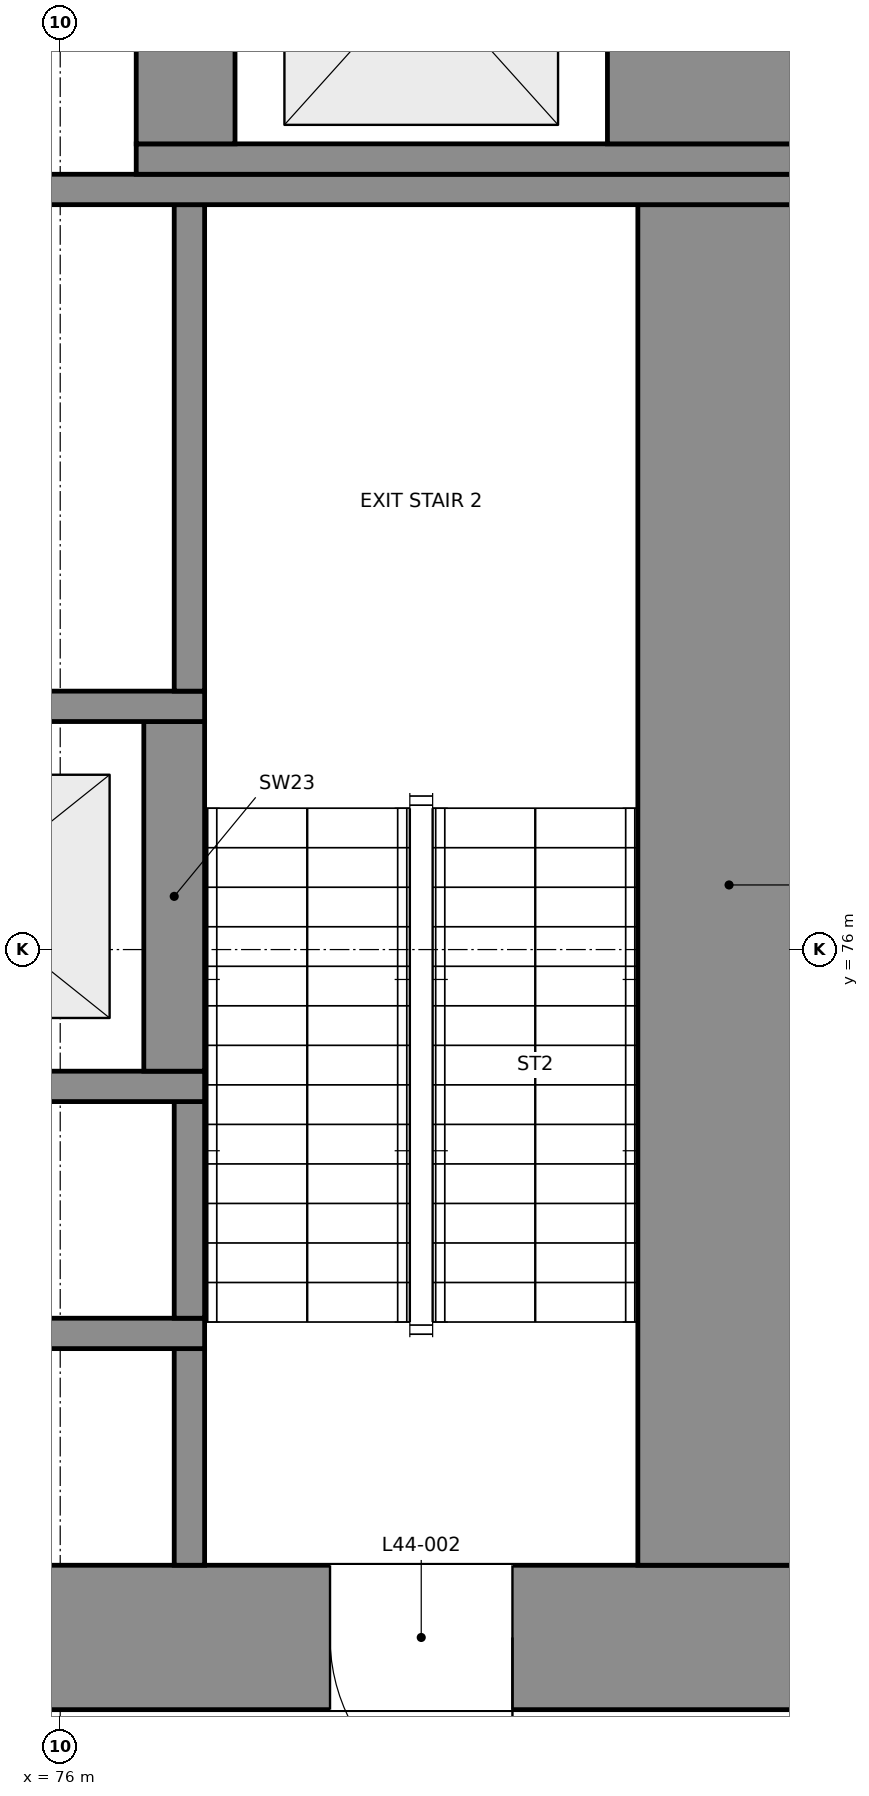
"""IFC4 building model, lengths in metres.
Left out: names, types, materials, properties, quantities, classifications, styles, units other than length and angle.
Written with IfcOpenShell. Run it as: python <this file> out.ifc"""

import sys

from ifc_helpers import new_model, si_unit, direction, frame, frame_2d, origin, place, context, subcontext, project, spatial, rectangle, extrude, element, fill, save


model = new_model("IFC4")
c1 = context("Model", 3, precision=1e-05, world=origin(), true_north=direction((0.0, 1.0)))
c2 = subcontext(c1, "Body", "Model", "MODEL_VIEW")
j1 = project(units=[si_unit("LENGTHUNIT", "METRE"), si_unit("PLANEANGLEUNIT", "RADIAN")], contexts=[c1])
p1 = place(None, origin())
s1 = spatial("IfcSite", under=j1, at=p1, CompositionType="ELEMENT")
p2 = place(p1, origin())
s2 = spatial("IfcBuilding", under=s1, at=p2, CompositionType="ELEMENT")
p3 = place(p2, frame((0.0, 0.0, 191.5)))
s3 = spatial("IfcBuildingStorey", under=s2, at=p3, CompositionType="ELEMENT", Elevation=191.5)
p4 = place(p3, frame((59.0, 71.475, 0.0), z_axis=(0.0, 0.0, 1.0), x_axis=(1.0, 0.0, 0.0)))
e1 = element("IfcWall", 1, at=p4, inside=s3, PredefinedType="SHEAR", context=c2, shape_type="SweptSolid", body=[
    extrude(rectangle(XDim=22.0, YDim=0.95, at=frame_2d((11.0, 0.0))), origin(), (0.0, 0.0, 1.0), 5.0),
])
p5 = place(p4, frame((2.025, 0.0, 0.0)))
e2 = element("IfcOpeningElement", 2, at=p5, cuts=e1, PredefinedType="OPENING", context=c2, shape_type="SweptSolid", body=[
    extrude(rectangle(XDim=1.2, YDim=2.1, at=frame_2d((0.6, 1.05))), frame((0.0, 0.485, 0.0), z_axis=(0.0, -1.0, 0.0), x_axis=(1.0, 0.0, 0.0)), (0.0, 0.0, 1.0), 0.97),
])
p6 = place(p4, frame((18.775, 0.0, 0.0)))
e3 = element("IfcOpeningElement", 3, at=p6, cuts=e1, PredefinedType="OPENING", context=c2, shape_type="SweptSolid", body=[
    extrude(rectangle(XDim=1.2, YDim=2.1, at=frame_2d((0.6, 1.05))), frame((0.0, 0.485, 0.0), z_axis=(0.0, -1.0, 0.0), x_axis=(1.0, 0.0, 0.0)), (0.0, 0.0, 1.0), 0.97),
])
p7 = place(p4, frame((10.0, 0.0, 0.0)))
e4 = element("IfcOpeningElement", 4, at=p7, cuts=e1, PredefinedType="OPENING", context=c2, shape_type="SweptSolid", body=[
    extrude(rectangle(XDim=2.0, YDim=2.1, at=frame_2d((1.0, 1.05))), frame((0.0, 0.485, 0.0), z_axis=(0.0, -1.0, 0.0), x_axis=(1.0, 0.0, 0.0)), (0.0, 0.0, 1.0), 0.97),
])
p8 = place(p3, frame((76.85, 71.95, 0.0), z_axis=(0.0, 0.0, 1.0), x_axis=(0.0, 1.0, 0.0)))
e5 = element("IfcWall", 5, at=p8, inside=s3, PredefinedType="SHEAR", context=c2, shape_type="SweptSolid", body=[
    extrude(rectangle(XDim=1.425, YDim=0.2, at=frame_2d((0.712, 0.0))), origin(), (0.0, 0.0, 1.0), 5.0),
])
p9 = place(p3, frame((80.4, 71.95, 0.0), z_axis=(0.0, 0.0, 1.0), x_axis=(0.0, 1.0, 0.0)))
e6 = element("IfcWall", 6, at=p9, inside=s3, PredefinedType="SHEAR", context=c2, shape_type="SweptSolid", body=[
    extrude(rectangle(XDim=8.95, YDim=1.2, at=frame_2d((4.475, 0.0))), origin(), (0.0, 0.0, 1.0), 5.0),
])
p10 = place(p3, frame((71.25, 73.475, 0.0), z_axis=(0.0, 0.0, 1.0), x_axis=(1.0, 0.0, 0.0)))
e7 = element("IfcWall", 7, at=p10, inside=s3, PredefinedType="SHEAR", context=c2, shape_type="SweptSolid", body=[
    extrude(rectangle(XDim=5.7, YDim=0.2, at=frame_2d((2.85, 0.0))), origin(), (0.0, 0.0, 1.0), 5.0),
])
p11 = place(p3, frame((76.85, 73.575, 0.0), z_axis=(0.0, 0.0, 1.0), x_axis=(0.0, 1.0, 0.0)))
e8 = element("IfcWall", 8, at=p11, inside=s3, PredefinedType="SHEAR", context=c2, shape_type="SweptSolid", body=[
    extrude(rectangle(XDim=1.425, YDim=0.2, at=frame_2d((0.712, 0.0))), origin(), (0.0, 0.0, 1.0), 5.0),
])
p12 = place(p3, frame((71.25, 75.1, 0.0), z_axis=(0.0, 0.0, 1.0), x_axis=(1.0, 0.0, 0.0)))
e9 = element("IfcWall", 9, at=p12, inside=s3, PredefinedType="SHEAR", context=c2, shape_type="SweptSolid", body=[
    extrude(rectangle(XDim=5.7, YDim=0.2, at=frame_2d((2.85, 0.0))), origin(), (0.0, 0.0, 1.0), 5.0),
])
p13 = place(p3, frame((76.75, 75.2, 0.0), z_axis=(0.0, 0.0, 1.0), x_axis=(0.0, 1.0, 0.0)))
e10 = element("IfcWall", 10, at=p13, inside=s3, PredefinedType="SHEAR", context=c2, shape_type="SweptSolid", body=[
    extrude(rectangle(XDim=2.3, YDim=0.4, at=frame_2d((1.15, 0.0))), origin(), (0.0, 0.0, 1.0), 5.0),
])
p14 = place(p3, frame((71.25, 77.6, 0.0), z_axis=(0.0, 0.0, 1.0), x_axis=(1.0, 0.0, 0.0)))
e11 = element("IfcWall", 11, at=p14, inside=s3, PredefinedType="SHEAR", context=c2, shape_type="SweptSolid", body=[
    extrude(rectangle(XDim=5.7, YDim=0.2, at=frame_2d((2.85, 0.0))), origin(), (0.0, 0.0, 1.0), 5.0),
])
p15 = place(p14, frame((0.875, 0.0, 0.0)))
e12 = element("IfcOpeningElement", 12, at=p15, cuts=e11, PredefinedType="OPENING", context=c2, shape_type="SweptSolid", body=[
    extrude(rectangle(XDim=1.1, YDim=2.1, at=frame_2d((0.55, 1.05))), frame((0.0, 0.11, 0.0), z_axis=(0.0, -1.0, 0.0), x_axis=(1.0, 0.0, 0.0)), (0.0, 0.0, 1.0), 0.22),
])
p16 = place(p14, frame((3.525, 0.0, 0.0)))
e13 = element("IfcOpeningElement", 13, at=p16, cuts=e11, PredefinedType="OPENING", context=c2, shape_type="SweptSolid", body=[
    extrude(rectangle(XDim=1.1, YDim=2.1, at=frame_2d((0.55, 1.05))), frame((0.0, 0.11, 0.0), z_axis=(0.0, -1.0, 0.0), x_axis=(1.0, 0.0, 0.0)), (0.0, 0.0, 1.0), 0.22),
])
p17 = place(p3, frame((76.85, 77.7, 0.0), z_axis=(0.0, 0.0, 1.0), x_axis=(0.0, 1.0, 0.0)))
e14 = element("IfcWall", 14, at=p17, inside=s3, PredefinedType="SHEAR", context=c2, shape_type="SweptSolid", body=[
    extrude(rectangle(XDim=3.2, YDim=0.2, at=frame_2d((1.6, 0.0))), origin(), (0.0, 0.0, 1.0), 5.0),
])
p18 = place(p3, frame((59.0, 81.0, 0.0), z_axis=(0.0, 0.0, 1.0), x_axis=(1.0, 0.0, 0.0)))
e15 = element("IfcWall", 15, at=p18, inside=s3, PredefinedType="SHEAR", context=c2, shape_type="SweptSolid", body=[
    extrude(rectangle(XDim=22.0, YDim=0.2, at=frame_2d((11.0, 0.0))), origin(), (0.0, 0.0, 1.0), 5.0),
])
p19 = place(p18, frame((11.015, 0.0, 0.0)))
e16 = element("IfcOpeningElement", 16, at=p19, cuts=e15, PredefinedType="OPENING", context=c2, shape_type="SweptSolid", body=[
    extrude(rectangle(XDim=0.9, YDim=2.1, at=frame_2d((0.45, 1.05))), frame((0.0, 0.11, 0.0), z_axis=(0.0, -1.0, 0.0), x_axis=(1.0, 0.0, 0.0)), (0.0, 0.0, 1.0), 0.22),
])
p20 = place(p18, frame((13.665, 0.0, 0.0)))
e17 = element("IfcOpeningElement", 17, at=p20, cuts=e15, PredefinedType="OPENING", context=c2, shape_type="SweptSolid", body=[
    extrude(rectangle(XDim=0.9, YDim=2.1, at=frame_2d((0.45, 1.05))), frame((0.0, 0.11, 0.0), z_axis=(0.0, -1.0, 0.0), x_axis=(1.0, 0.0, 0.0)), (0.0, 0.0, 1.0), 0.22),
])
p21 = place(p3, frame((76.5, 81.2, 0.0), z_axis=(0.0, 0.0, 1.0), x_axis=(1.0, 0.0, 0.0)))
e18 = element("IfcWall", 18, at=p21, inside=s3, PredefinedType="SHEAR", context=c2, shape_type="SweptSolid", body=[
    extrude(rectangle(XDim=4.5, YDim=0.2, at=frame_2d((2.25, 0.0))), origin(), (0.0, 0.0, 1.0), 5.0),
])
p22 = place(p3, frame((76.825, 81.3, 0.0), z_axis=(0.0, 0.0, 1.0), x_axis=(0.0, 1.0, 0.0)))
e19 = element("IfcWall", 19, at=p22, inside=s3, PredefinedType="SHEAR", context=c2, shape_type="SweptSolid", body=[
    extrude(rectangle(XDim=2.25, YDim=0.65, at=frame_2d((1.125, 0.0))), origin(), (0.0, 0.0, 1.0), 5.0),
])
p23 = place(p3, frame((80.3, 81.3, 0.0), z_axis=(0.0, 0.0, 1.0), x_axis=(0.0, 1.0, 0.0)))
e20 = element("IfcWall", 20, at=p23, inside=s3, PredefinedType="SHEAR", context=c2, shape_type="SweptSolid", body=[
    extrude(rectangle(XDim=2.25, YDim=1.4, at=frame_2d((1.125, 0.0))), origin(), (0.0, 0.0, 1.0), 5.0),
])
p24 = place(p6, frame((1.2, 0.0, 0.0), z_axis=(0.0, 0.0, 1.0), x_axis=(-1.0, 0.0, 0.0)))
e21 = element("IfcDoor", 21, at=p24, inside=s3, OperationType="SINGLE_SWING_LEFT", PredefinedType="DOOR", context=c2, shape_type="SweptSolid", body=[
    extrude(rectangle(XDim=1.2, YDim=2.1, at=frame_2d((0.6, 1.05))), frame((0.0, 0.025, 0.0), z_axis=(0.0, -1.0, 0.0), x_axis=(1.0, 0.0, 0.0)), (0.0, 0.0, 1.0), 0.05),
])
fill(e3, e21)
save(model, sys.argv[1])
